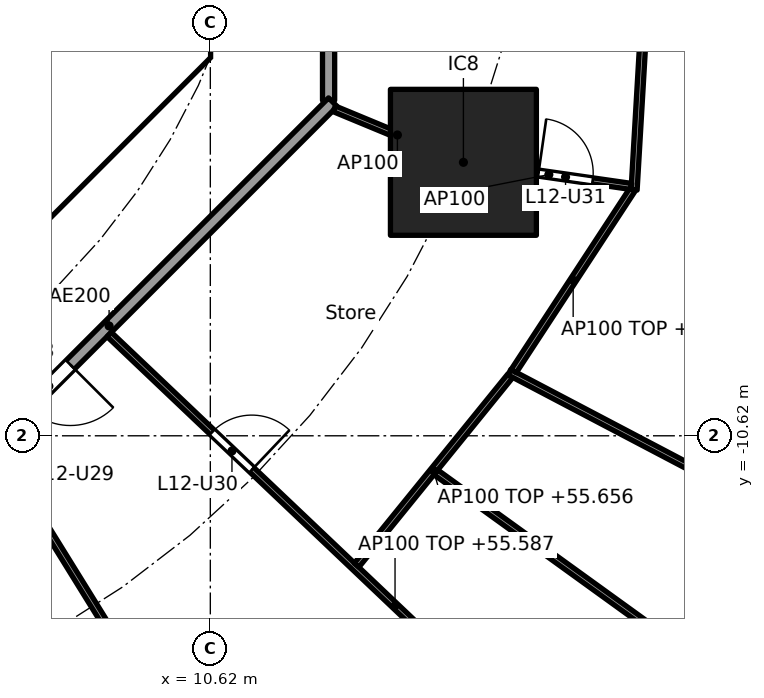
"""IFC4 building model, lengths in metres.
Left out: names, types, materials, properties, quantities, classifications, styles, units other than length and angle.
Written with IfcOpenShell. Run it as: python <this file> out.ifc"""

import sys

from ifc_helpers import new_model, si_unit, direction, frame, frame_2d, origin, origin_2d, place, context, subcontext, project, spatial, polyline, rectangle, outline, extrude, element, fill, save


model = new_model("IFC4")
c1 = context("Model", 3, precision=1e-05, world=origin(), true_north=direction((0.0, 1.0)))
c2 = subcontext(c1, "Body", "Model", "MODEL_VIEW")
j1 = project(units=[si_unit("LENGTHUNIT", "METRE"), si_unit("PLANEANGLEUNIT", "RADIAN")], contexts=[c1])
p1 = place(None, origin())
s1 = spatial("IfcSite", under=j1, at=p1, CompositionType="ELEMENT")
p2 = place(p1, origin())
s2 = spatial("IfcBuilding", under=s1, at=p2, CompositionType="ELEMENT")
p3 = place(p2, frame((0.0, 0.0, 52.9)))
s3 = spatial("IfcBuildingStorey", under=s2, at=p3, CompositionType="ELEMENT", Elevation=52.9)
p4 = place(p3, frame((14.782, -6.123, 0.0), z_axis=(0.0, 0.0, 1.0), x_axis=(1.0, 0.0, 0.0)))
e1 = element("IfcColumn", 1, at=p4, inside=s3, PredefinedType="COLUMN", context=c2, shape_type="SweptSolid", body=[
    extrude(rectangle(XDim=2.4, YDim=2.4, at=origin_2d()), origin(), (0.0, 0.0, 1.0), 3.7),
])
p5 = place(p3, frame((4.613, -9.988, 0.0), z_axis=(0.0, 0.0, 1.0), x_axis=(0.707106781187, 0.707106781187, 0.0)))
e2 = element("IfcWall", 2, at=p5, inside=s3, PredefinedType="SHEAR", context=c2, shape_type="SweptSolid", body=[
    extrude(rectangle(XDim=7.602, YDim=0.6, at=frame_2d((3.801, 0.0))), origin(), (0.0, 0.0, 1.0), 3.44),
])
p6 = place(p5, frame((3.201, 0.0, 0.0)))
e3 = element("IfcOpeningElement", 3, at=p6, cuts=e2, PredefinedType="OPENING", context=c2, shape_type="SweptSolid", body=[
    extrude(rectangle(XDim=1.2, YDim=2.1, at=frame_2d((0.6, 1.05))), frame((0.0, 0.31, 0.0), z_axis=(0.0, -1.0, 0.0), x_axis=(1.0, 0.0, 0.0)), (0.0, 0.0, 1.0), 0.62),
])
p7 = place(p3, origin())
e4 = element("IfcWall", 4, at=p7, inside=s3, PredefinedType="SHEAR", context=c2, shape_type="SweptSolid", body=[
    extrude(outline(polyline([(9.776, -4.401), (10.025, -4.152), (10.025, -3.801), (10.025, 4.152), (9.776, 4.401), (10.2, 4.825), (10.625, 4.401), (10.625, -4.401), (10.2, -4.825), (9.776, -4.401)])), origin(), (0.0, 0.0, 1.0), 3.44),
])
p8 = place(p3, frame((12.565, -5.104, 0.0), z_axis=(0.0, 0.0, 1.0), x_axis=(0.0, 1.0, 0.0)))
e5 = element("IfcWall", 5, at=p8, inside=s3, PredefinedType="PARTITIONING", context=c2, shape_type="SweptSolid", body=[
    extrude(rectangle(XDim=10.209, YDim=0.2, at=frame_2d((5.104, 0.0))), origin(), (0.0, 0.0, 1.0), 3.44),
])
p9 = place(p3, frame((5.275, -12.494, 0.0), z_axis=(0.0, 0.0, 1.0), x_axis=(0.707106781187, 0.707106781187, 0.0)))
e6 = element("IfcWall", 6, at=p9, inside=s3, PredefinedType="PARTITIONING", context=c2, shape_type="SweptSolid", body=[
    extrude(rectangle(XDim=10.409, YDim=0.2, at=frame_2d((5.205, 0.0))), origin(), (0.0, 0.0, 1.0), 3.44),
])
p10 = place(p9, frame((3.303, 0.0, 0.0)))
e7 = element("IfcOpeningElement", 7, at=p10, cuts=e6, PredefinedType="OPENING", context=c2, shape_type="SweptSolid", body=[
    extrude(rectangle(XDim=1.0, YDim=2.1, at=frame_2d((0.5, 1.05))), frame((0.0, 0.11, 0.0), z_axis=(0.0, -1.0, 0.0), x_axis=(1.0, 0.0, 0.0)), (0.0, 0.0, 1.0), 0.22),
])
p11 = place(p3, frame((17.971, -0.05, 0.0), z_axis=(0.0, 0.0, 1.0), x_axis=(-0.058476853647, -0.998288764631, 0.0)))
e8 = element("IfcWall", 8, at=p11, inside=s3, PredefinedType="PARTITIONING", context=c2, shape_type="SweptSolid", body=[
    extrude(rectangle(XDim=6.538, YDim=0.1, at=frame_2d((3.269, 0.0))), origin(), (0.0, 0.0, 1.0), 2.756),
])
p12 = place(p11, frame((2.794, 0.0, 0.0)))
e9 = element("IfcOpeningElement", 9, at=p12, cuts=e8, PredefinedType="OPENING", context=c2, shape_type="SweptSolid", body=[
    extrude(rectangle(XDim=0.9, YDim=2.1, at=frame_2d((0.45, 1.05))), frame((0.0, 0.06, 0.0), z_axis=(0.0, -1.0, 0.0), x_axis=(1.0, 0.0, 0.0)), (0.0, 0.0, 1.0), 0.12),
])
p13 = place(p3, frame((7.097, -10.81, 0.0), z_axis=(0.0, 0.0, 1.0), x_axis=(0.526453266471, -0.850204068576, 0.0)))
e10 = element("IfcWall", 10, at=p13, inside=s3, PredefinedType="PARTITIONING", context=c2, shape_type="SweptSolid", body=[
    extrude(rectangle(XDim=19.85, YDim=0.1, at=frame_2d((9.925, 0.0))), origin(), (0.0, 0.0, 1.0), 2.687),
])
p14 = place(p13, frame((0.35, 0.0, 0.0)))
e11 = element("IfcOpeningElement", 11, at=p14, cuts=e10, PredefinedType="OPENING", context=c2, shape_type="SweptSolid", body=[
    extrude(rectangle(XDim=0.9, YDim=2.1, at=frame_2d((0.45, 1.05))), frame((0.0, 0.06, 0.0), z_axis=(0.0, -1.0, 0.0), x_axis=(1.0, 0.0, 0.0)), (0.0, 0.0, 1.0), 0.12),
])
p15 = place(p13, frame((8.795, 0.0, 0.0)))
e12 = element("IfcOpeningElement", 12, at=p15, cuts=e10, PredefinedType="OPENING", context=c2, shape_type="SweptSolid", body=[
    extrude(rectangle(XDim=0.9, YDim=2.1, at=frame_2d((0.45, 1.05))), frame((0.0, 0.06, 0.0), z_axis=(0.0, -1.0, 0.0), x_axis=(1.0, 0.0, 0.0)), (0.0, 0.0, 1.0), 0.12),
])
p16 = place(p3, frame((8.957, -8.953, 0.0), z_axis=(0.0, 0.0, 1.0), x_axis=(0.725250022034, -0.688485588476, 0.0)))
e13 = element("IfcWall", 13, at=p16, inside=s3, PredefinedType="PARTITIONING", context=c2, shape_type="SweptSolid", body=[
    extrude(rectangle(XDim=12.963, YDim=0.1, at=frame_2d((6.481, 0.0))), origin(), (0.0, 0.0, 1.0), 2.687),
])
p17 = place(p16, frame((2.333, 0.0, 0.0)))
e14 = element("IfcOpeningElement", 14, at=p17, cuts=e13, PredefinedType="OPENING", context=c2, shape_type="SweptSolid", body=[
    extrude(rectangle(XDim=0.9, YDim=2.1, at=frame_2d((0.45, 1.05))), frame((0.0, 0.06, 0.0), z_axis=(0.0, -1.0, 0.0), x_axis=(1.0, 0.0, 0.0)), (0.0, 0.0, 1.0), 0.12),
])
p18 = place(p16, frame((8.79, 0.0, 0.0)))
e15 = element("IfcOpeningElement", 15, at=p18, cuts=e13, PredefinedType="OPENING", context=c2, shape_type="SweptSolid", body=[
    extrude(rectangle(XDim=0.9, YDim=2.1, at=frame_2d((0.45, 1.05))), frame((0.0, 0.06, 0.0), z_axis=(0.0, -1.0, 0.0), x_axis=(1.0, 0.0, 0.0)), (0.0, 0.0, 1.0), 0.12),
])
p19 = place(p3, frame((13.026, -12.747, 0.0), z_axis=(0.0, 0.0, 1.0), x_axis=(0.630126826288, 0.776492229705, 0.0)))
e16 = element("IfcWall", 16, at=p19, inside=s3, PredefinedType="PARTITIONING", context=c2, shape_type="SweptSolid", body=[
    extrude(rectangle(XDim=4.007, YDim=0.1, at=frame_2d((2.003, 0.0))), origin(), (0.0, 0.0, 1.0), 2.756),
])
p20 = place(p3, frame((18.351, -17.803, 0.0), z_axis=(0.0, 0.0, 1.0), x_axis=(0.584563700282, 0.811347817099, 0.0)))
e17 = element("IfcWall", 17, at=p20, inside=s3, PredefinedType="PARTITIONING", context=c2, shape_type="SweptSolid", body=[
    extrude(rectangle(XDim=5.984, YDim=0.1, at=frame_2d((2.992, 0.0))), origin(), (0.0, 0.0, 1.0), 2.756),
])
p21 = place(p20, frame((4.038, 0.0, 0.0)))
e18 = element("IfcOpeningElement", 18, at=p21, cuts=e17, PredefinedType="OPENING", context=c2, shape_type="SweptSolid", body=[
    extrude(rectangle(XDim=0.9, YDim=2.1, at=frame_2d((0.45, 1.05))), frame((0.0, 0.06, 0.0), z_axis=(0.0, -1.0, 0.0), x_axis=(1.0, 0.0, 0.0)), (0.0, 0.0, 1.0), 0.12),
])
p22 = place(p3, frame((14.329, -11.221, 0.0), z_axis=(0.0, 0.0, 1.0), x_axis=(0.810671130917, -0.58550176558, 0.0)))
e19 = element("IfcWall", 19, at=p22, inside=s3, PredefinedType="PARTITIONING", context=c2, shape_type="SweptSolid", body=[
    extrude(rectangle(XDim=15.106, YDim=0.1, at=frame_2d((7.553, 0.0))), origin(), (0.0, 0.0, 1.0), 2.837),
])
p23 = place(p22, frame((10.659, 0.0, 0.0)))
e20 = element("IfcOpeningElement", 20, at=p23, cuts=e19, PredefinedType="OPENING", context=c2, shape_type="SweptSolid", body=[
    extrude(rectangle(XDim=0.9, YDim=2.1, at=frame_2d((0.45, 1.05))), frame((0.0, 0.06, 0.0), z_axis=(0.0, -1.0, 0.0), x_axis=(1.0, 0.0, 0.0)), (0.0, 0.0, 1.0), 0.12),
])
p24 = place(p3, frame((15.538, -9.574, 0.0), z_axis=(0.0, 0.0, 1.0), x_axis=(0.88517945493, -0.465249752895, 0.0)))
e21 = element("IfcWall", 21, at=p24, inside=s3, PredefinedType="PARTITIONING", context=c2, shape_type="SweptSolid", body=[
    extrude(rectangle(XDim=7.213, YDim=0.1, at=frame_2d((3.606, 0.0))), origin(), (0.0, 0.0, 1.0), 3.44),
])
p25 = place(p3, frame((15.609, -9.556, 0.0), z_axis=(0.0, 0.0, 1.0), x_axis=(0.547641765292, 0.836712911881, 0.0)))
e22 = element("IfcWall", 22, at=p25, inside=s3, PredefinedType="PARTITIONING", context=c2, shape_type="SweptSolid", body=[
    extrude(rectangle(XDim=3.57, YDim=0.1, at=frame_2d((1.785, 0.0))), origin(), (0.0, 0.0, 1.0), 2.756),
])
p26 = place(p3, frame((12.657, -5.243, 0.0), z_axis=(0.0, 0.0, 1.0), x_axis=(0.923864733477, -0.382719158442, 0.0)))
e23 = element("IfcWall", 23, at=p26, inside=s3, PredefinedType="PARTITIONING", context=c2, shape_type="SweptSolid", body=[
    extrude(rectangle(XDim=2.25, YDim=0.1, at=frame_2d((1.125, 0.0))), origin(), (0.0, 0.0, 1.0), 3.44),
])
p27 = place(p3, frame((14.832, -6.13, 0.0), z_axis=(0.0, 0.0, 1.0), x_axis=(0.989840446863, -0.142182593007, 0.0)))
e24 = element("IfcWall", 24, at=p27, inside=s3, PredefinedType="PARTITIONING", context=c2, shape_type="SweptSolid", body=[
    extrude(rectangle(XDim=2.739, YDim=0.1, at=frame_2d((1.369, 0.0))), origin(), (0.0, 0.0, 1.0), 3.44),
])
p28 = place(p27, frame((1.197, 0.0, 0.0)))
e25 = element("IfcOpeningElement", 25, at=p28, cuts=e24, PredefinedType="OPENING", context=c2, shape_type="SweptSolid", body=[
    extrude(rectangle(XDim=0.9, YDim=2.1, at=frame_2d((0.45, 1.05))), frame((0.0, 0.06, 0.0), z_axis=(0.0, -1.0, 0.0), x_axis=(1.0, 0.0, 0.0)), (0.0, 0.0, 1.0), 0.12),
])
p29 = place(p10, frame((1.0, 0.0, 0.0), x_axis=(-1.0, 0.0, 0.0)))
e26 = element("IfcDoor", 26, at=p29, inside=s3, OperationType="SINGLE_SWING_LEFT", PredefinedType="DOOR", context=c2, shape_type="SweptSolid", body=[
    extrude(rectangle(XDim=1.0, YDim=2.1, at=frame_2d((0.5, 1.05))), frame((0.0, 0.025, 0.0), z_axis=(0.0, -1.0, 0.0), x_axis=(1.0, 0.0, 0.0)), (0.0, 0.0, 1.0), 0.05),
])
fill(e7, e26)
p30 = place(p17, origin())
e27 = element("IfcDoor", 27, at=p30, inside=s3, OperationType="SINGLE_SWING_RIGHT", PredefinedType="DOOR", context=c2, shape_type="SweptSolid", body=[
    extrude(rectangle(XDim=0.9, YDim=2.1, at=frame_2d((0.45, 1.05))), frame((0.0, 0.025, 0.0), z_axis=(0.0, -1.0, 0.0), x_axis=(1.0, 0.0, 0.0)), (0.0, 0.0, 1.0), 0.05),
])
fill(e14, e27)
p31 = place(p28, origin())
e28 = element("IfcDoor", 28, at=p31, inside=s3, OperationType="SINGLE_SWING_LEFT", PredefinedType="DOOR", context=c2, shape_type="SweptSolid", body=[
    extrude(rectangle(XDim=0.9, YDim=2.1, at=frame_2d((0.45, 1.05))), frame((0.0, 0.025, 0.0), z_axis=(0.0, -1.0, 0.0), x_axis=(1.0, 0.0, 0.0)), (0.0, 0.0, 1.0), 0.05),
])
fill(e25, e28)
save(model, sys.argv[1])
